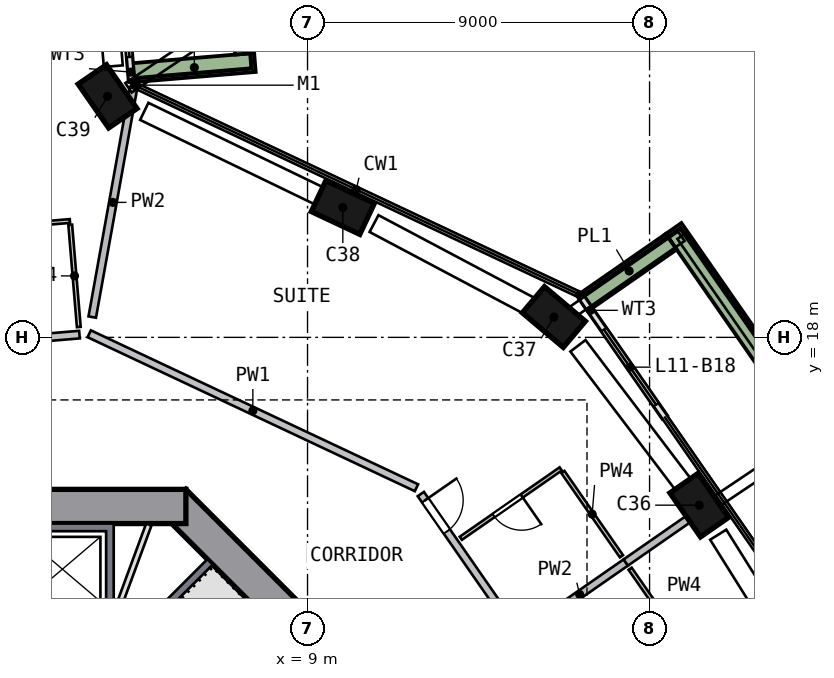
"""IFC4 building model, lengths in metres.
Left out: names, types, materials, properties, quantities, classifications, styles, units other than length and angle.
Written with IfcOpenShell. Run it as: python <this file> out.ifc"""

import sys

from ifc_helpers import new_model, si_unit, direction, frame, frame_2d, origin, origin_2d, place, context, subcontext, project, spatial, polyline, rectangle, outline, extrude, element, fill, save


model = new_model("IFC4")
c1 = context("Model", 3, precision=1e-05, world=origin(), true_north=direction((0.0, 1.0)))
c2 = subcontext(c1, "Body", "Model", "MODEL_VIEW")
j1 = project(units=[si_unit("LENGTHUNIT", "METRE"), si_unit("PLANEANGLEUNIT", "RADIAN")], contexts=[c1])
p1 = place(None, origin())
s1 = spatial("IfcSite", under=j1, at=p1, CompositionType="ELEMENT")
p2 = place(p1, origin())
s2 = spatial("IfcBuilding", under=s1, at=p2, CompositionType="ELEMENT")
p3 = place(p2, frame((0.0, 0.0, 53.0)))
s3 = spatial("IfcBuildingStorey", under=s2, at=p3, CompositionType="ELEMENT", Elevation=53.0)
p4 = place(p3, frame((19.386, 13.474, 0.0), z_axis=(-0.064871143, 0.091640946, 0.993676845), x_axis=(-0.567217406, 0.815879269, -0.112273915)))
e1 = element("IfcColumn", 1, at=p4, inside=s3, PredefinedType="COLUMN", context=c2, shape_type="SweptSolid", body=[
    extrude(rectangle(XDim=1.4, YDim=0.9, at=origin_2d()), origin(), (0.0, 0.0, 1.0), 3.21),
])
p5 = place(p3, frame((15.589, 18.447, 0.0), z_axis=(-0.088344265, 0.073442823, 0.993378801), x_axis=(0.758470218, -0.641502385, 0.114880889)))
e2 = element("IfcColumn", 2, at=p5, inside=s3, PredefinedType="COLUMN", context=c2, shape_type="SweptSolid", body=[
    extrude(rectangle(XDim=1.4, YDim=0.9, at=origin_2d()), origin(), (0.0, 0.0, 1.0), 3.211),
])
p6 = place(p3, frame((10.052, 21.362, 0.0), z_axis=(-0.10198402, 0.046923296, 0.993678753), x_axis=(-0.899155521, 0.422986653, -0.112257027)))
e3 = element("IfcColumn", 3, at=p6, inside=s3, PredefinedType="COLUMN", context=c2, shape_type="SweptSolid", body=[
    extrude(rectangle(XDim=1.4, YDim=0.9, at=origin_2d()), origin(), (0.0, 0.0, 1.0), 3.21),
])
p7 = place(p3, frame((3.878, 24.322, 0.0), z_axis=(-0.115760507, 0.017481889, 0.9931233), x_axis=(0.563120389, -0.822482073, 0.08011658)))
e4 = element("IfcColumn", 4, at=p7, inside=s3, PredefinedType="COLUMN", context=c2, shape_type="SweptSolid", body=[
    extrude(rectangle(XDim=1.4, YDim=0.9, at=origin_2d()), origin(), (0.0, 0.0, 1.0), 3.212),
])
p8 = place(p3, frame((13.682, 5.481, 0.0), z_axis=(0.0, 0.0, 1.0), x_axis=(-0.707106781, 0.707106781, 0.0)))
e5 = element("IfcWall", 5, at=p8, inside=s3, PredefinedType="SHEAR", context=c2, shape_type="SweptSolid", body=[
    extrude(rectangle(XDim=11.598, YDim=0.9, at=frame_2d((5.799, 0.0))), origin(), (0.0, 0.0, 1.0), 3.5),
])
p9 = place(p8, frame((2.099, 0.0, 0.0)))
e6 = element("IfcOpeningElement", 6, at=p9, cuts=e5, PredefinedType="OPENING", context=c2, shape_type="SweptSolid", body=[
    extrude(rectangle(XDim=1.2, YDim=2.1, at=frame_2d((0.6, 1.05))), frame((0.0, 0.46, 0.0), z_axis=(0.0, -1.0, 0.0), x_axis=(1.0, 0.0, 0.0)), (0.0, 0.0, 1.0), 0.92),
])
p10 = place(p3, frame((5.799, 13.55, 0.0), z_axis=(0.0, 0.0, 1.0), x_axis=(-1.0, 0.0, 0.0)))
e7 = element("IfcWall", 7, at=p10, inside=s3, PredefinedType="SHEAR", context=c2, shape_type="SweptSolid", body=[
    extrude(rectangle(XDim=11.598, YDim=0.9, at=frame_2d((5.799, 0.0))), origin(), (0.0, 0.0, 1.0), 3.5),
])
p11 = place(p10, frame((4.899, 0.0, 0.0)))
e8 = element("IfcOpeningElement", 8, at=p11, cuts=e7, PredefinedType="OPENING", context=c2, shape_type="SweptSolid", body=[
    extrude(rectangle(XDim=1.8, YDim=2.1, at=frame_2d((0.9, 1.05))), frame((0.0, 0.46, 0.0), z_axis=(0.0, -1.0, 0.0), x_axis=(1.0, 0.0, 0.0)), (0.0, 0.0, 1.0), 0.92),
])
p12 = place(p3, frame((4.367, 24.781, 0.0), z_axis=(0.0, 0.0, 1.0), x_axis=(-0.083674993, 0.996493099, 0.0)))
e9 = element("IfcWall", 9, at=p12, inside=s3, PredefinedType="SOLIDWALL", context=c2, shape_type="SweptSolid", body=[
    extrude(rectangle(XDim=3.402, YDim=0.15, at=frame_2d((1.701, 0.0))), origin(), (0.0, 0.0, 1.0), 2.425),
])
p13 = place(p12, frame((0.602, 0.0, 0.0)))
e10 = element("IfcOpeningElement", 10, at=p13, cuts=e9, PredefinedType="OPENING", context=c2, shape_type="SweptSolid", body=[
    extrude(rectangle(XDim=2.4, YDim=2.4, at=frame_2d((1.2, 1.2))), frame((0.0, 0.085, 0.0), z_axis=(0.0, -1.0, 0.0), x_axis=(1.0, 0.0, 0.0)), (0.0, 0.0, 1.0), 0.17),
])
p14 = place(p3, frame((18.398, 15.902, 0.0), z_axis=(0.0, 0.0, 1.0), x_axis=(-0.570742323, 0.821129223, 0.0)))
e11 = element("IfcWall", 11, at=p14, inside=s3, PredefinedType="SOLIDWALL", context=c2, shape_type="SweptSolid", body=[
    extrude(rectangle(XDim=3.842, YDim=0.15, at=frame_2d((1.921, 0.0))), origin(), (0.0, 0.0, 1.0), 2.425),
])
p15 = place(p14, frame((0.4, 0.0, 0.0)))
e12 = element("IfcOpeningElement", 12, at=p15, cuts=e11, PredefinedType="OPENING", context=c2, shape_type="SweptSolid", body=[
    extrude(rectangle(XDim=2.4, YDim=2.4, at=frame_2d((1.2, 1.2))), frame((0.0, 0.085, 0.0), z_axis=(0.0, -1.0, 0.0), x_axis=(1.0, 0.0, 0.0)), (0.0, 0.0, 1.0), 0.17),
])
p16 = place(p3, frame((26.465, 9.597, 0.0), z_axis=(0.0, 0.0, 1.0), x_axis=(-0.570705822, 0.821154593, 0.0)))
e13 = element("IfcWall", 13, at=p16, inside=s3, PredefinedType="SOLIDWALL", context=c2, shape_type="SweptSolid", body=[
    extrude(rectangle(XDim=13.723, YDim=0.5, at=frame_2d((6.862, 0.0))), origin(), (0.0, 0.0, 1.0), 0.7),
])
p17 = place(p3, frame((18.57, 20.518, 0.0), z_axis=(0.0, 0.0, 1.0), x_axis=(-0.821165079, -0.570690734, 0.0)))
e14 = element("IfcWall", 14, at=p17, inside=s3, PredefinedType="SOLIDWALL", context=c2, shape_type="SweptSolid", body=[
    extrude(rectangle(XDim=2.699, YDim=0.5, at=frame_2d((1.35, 0.0))), origin(), (0.0, 0.0, 1.0), 0.7),
])
p18 = place(p3, frame((4.427, 24.966, 0.0), z_axis=(0.0, 0.0, 1.0), x_axis=(0.996489211, 0.083721273, 0.0)))
e15 = element("IfcWall", 15, at=p18, inside=s3, PredefinedType="SOLIDWALL", context=c2, shape_type="SweptSolid", body=[
    extrude(rectangle(XDim=3.199, YDim=0.5, at=frame_2d((1.6, 0.0))), origin(), (0.0, 0.0, 1.0), 0.7),
])
p19 = place(p3, frame((7.345, 25.462, 0.0), z_axis=(0.0, 0.0, 1.0), x_axis=(-0.08367557, 0.99649305, 0.0)))
e16 = element("IfcWall", 16, at=p19, inside=s3, PredefinedType="SOLIDWALL", context=c2, shape_type="SweptSolid", body=[
    extrude(rectangle(XDim=16.033, YDim=0.5, at=frame_2d((8.016, 0.0))), origin(), (0.0, 0.0, 1.0), 0.7),
])
p20 = place(p3, origin())
e17 = element("IfcWall", 17, at=p20, inside=s3, PredefinedType="SOLIDWALL", context=c2, shape_type="SweptSolid", body=[
    extrude(outline(polyline([(3.9, 13.1), (3.9, 10.9), (3.7, 10.9), (3.7, 12.9), (1.4, 12.9), (1.4, 10.9), (1.2, 10.9), (1.2, 13.1), (3.9, 13.1)])), origin(), (0.0, 0.0, 1.0), 3.19),
])
p21 = place(p3, frame((3.677, 9.334, 0.0), z_axis=(0.0, 0.0, 1.0), x_axis=(0.707106781, 0.707106781, 0.0)))
e18 = element("IfcWall", 18, at=p21, inside=s3, PredefinedType="SOLIDWALL", context=c2, shape_type="SweptSolid", body=[
    extrude(rectangle(XDim=3.9, YDim=0.2, at=frame_2d((1.95, 0.0))), origin(), (0.0, 0.0, 1.0), 3.19),
])
p22 = place(p3, frame((1.776, 4.813, 0.0), z_axis=(0.0, 0.0, 1.0), x_axis=(0.346112737, 0.93819293, 0.0)))
e19 = element("IfcWall", 19, at=p22, inside=s3, PredefinedType="PARTITIONING", context=c2, shape_type="SweptSolid", body=[
    extrude(rectangle(XDim=8.803, YDim=0.15, at=frame_2d((4.402, 0.0))), origin(), (0.0, 0.0, 1.0), 3.19),
])
p23 = place(p22, frame((1.4, 0.0, 0.0)))
e20 = element("IfcOpeningElement", 20, at=p23, cuts=e19, PredefinedType="OPENING", context=c2, shape_type="SweptSolid", body=[
    extrude(rectangle(XDim=1.8, YDim=2.1, at=frame_2d((0.9, 1.05))), frame((0.0, 0.085, 0.0), z_axis=(0.0, -1.0, 0.0), x_axis=(1.0, 0.0, 0.0)), (0.0, 0.0, 1.0), 0.17),
])
p24 = place(p3, frame((2.998, 18.073, 0.0), z_axis=(0.0, 0.0, 1.0), x_axis=(-0.996495064, -0.083651589, 0.0)))
e21 = element("IfcWall", 21, at=p24, inside=s3, PredefinedType="SOLIDWALL", context=c2, shape_type="SweptSolid", body=[
    extrude(rectangle(XDim=3.4, YDim=0.2, at=frame_2d((1.7, 0.0))), origin(), (0.0, 0.0, 1.0), 3.19),
])
p25 = place(p3, frame((11.866, 14.042, 0.0), z_axis=(0.0, 0.0, 1.0), x_axis=(-0.90483033, 0.425772326, 0.0)))
e22 = element("IfcWall", 22, at=p25, inside=s3, PredefinedType="SOLIDWALL", context=c2, shape_type="SweptSolid", body=[
    extrude(rectangle(XDim=9.516, YDim=0.2, at=frame_2d((4.758, 0.0))), origin(), (0.0, 0.0, 1.0), 3.19),
])
p26 = place(p3, frame((11.981, 13.877, 0.0), z_axis=(0.0, 0.0, 1.0), x_axis=(0.570714468, -0.821148583, 0.0)))
e23 = element("IfcWall", 23, at=p26, inside=s3, PredefinedType="SOLIDWALL", context=c2, shape_type="SweptSolid", body=[
    extrude(rectangle(XDim=9.116, YDim=0.2, at=frame_2d((4.558, 0.0))), origin(), (0.0, 0.0, 1.0), 3.19),
])
p27 = place(p26, frame((0.2, 0.0, 0.0)))
e24 = element("IfcOpeningElement", 24, at=p27, cuts=e23, PredefinedType="OPENING", context=c2, shape_type="SweptSolid", body=[
    extrude(rectangle(XDim=1.0, YDim=2.1, at=frame_2d((0.5, 1.05))), frame((0.0, 0.11, 0.0), z_axis=(0.0, -1.0, 0.0), x_axis=(1.0, 0.0, 0.0)), (0.0, 0.0, 1.0), 0.22),
])
p28 = place(p3, frame((4.421, 24.57, 0.0), z_axis=(0.0, 0.0, 1.0), x_axis=(-0.177091295, -0.984194429, 0.0)))
e25 = element("IfcWall", 25, at=p28, inside=s3, PredefinedType="SOLIDWALL", context=c2, shape_type="SweptSolid", body=[
    extrude(rectangle(XDim=6.132, YDim=0.2, at=frame_2d((3.066, 0.0))), origin(), (0.0, 0.0, 1.0), 3.19),
])
p29 = place(p3, frame((14.949, 10.39, 0.0), z_axis=(0.0, 0.0, 1.0), x_axis=(0.82115792, 0.570701034, 0.0)))
e26 = element("IfcWall", 26, at=p29, inside=s3, PredefinedType="SOLIDWALL", context=c2, shape_type="SweptSolid", body=[
    extrude(rectangle(XDim=2.953, YDim=0.2, at=frame_2d((1.476, 0.0))), origin(), (0.0, 0.0, 1.0), 3.19),
])
p30 = place(p3, frame((17.374, 12.075, 0.0), z_axis=(0.0, 0.0, 1.0), x_axis=(0.821109247, 0.570771062, 0.0)))
e27 = element("IfcWall", 27, at=p30, inside=s3, PredefinedType="SOLIDWALL", context=c2, shape_type="SweptSolid", body=[
    extrude(rectangle(XDim=2.95, YDim=0.2, at=frame_2d((1.475, 0.0))), origin(), (0.0, 0.0, 1.0), 3.19),
])
p31 = place(p3, frame((2.747, 21.062, 0.0), z_axis=(0.0, 0.0, 1.0), x_axis=(-0.996491885, -0.08368945, 0.0)))
e28 = element("IfcWall", 28, at=p31, inside=s3, PredefinedType="PARTITIONING", context=c2, shape_type="SweptSolid", body=[
    extrude(rectangle(XDim=3.2, YDim=0.1, at=frame_2d((1.6, 0.0))), origin(), (0.0, 0.0, 1.0), 3.19),
])
p32 = place(p31, frame((1.25, 0.0, 0.0)))
e29 = element("IfcOpeningElement", 29, at=p32, cuts=e28, PredefinedType="OPENING", context=c2, shape_type="SweptSolid", body=[
    extrude(rectangle(XDim=0.9, YDim=2.1, at=frame_2d((0.45, 1.05))), frame((0.0, 0.06, 0.0), z_axis=(0.0, -1.0, 0.0), x_axis=(1.0, 0.0, 0.0)), (0.0, 0.0, 1.0), 0.12),
])
p33 = place(p3, frame((2.981, 18.272, 0.0), z_axis=(0.0, 0.0, 1.0), x_axis=(-0.083644148, 0.996495688, 0.0)))
e30 = element("IfcWall", 30, at=p33, inside=s3, PredefinedType="PARTITIONING", context=c2, shape_type="SweptSolid", body=[
    extrude(rectangle(XDim=2.7, YDim=0.1, at=frame_2d((1.35, 0.0))), origin(), (0.0, 0.0, 1.0), 3.19),
])
p34 = place(p3, frame((15.662, 14.539, 0.0), z_axis=(0.0, 0.0, 1.0), x_axis=(-0.821155462, -0.570704572, 0.0)))
e31 = element("IfcWall", 31, at=p34, inside=s3, PredefinedType="PARTITIONING", context=c2, shape_type="SweptSolid", body=[
    extrude(rectangle(XDim=3.2, YDim=0.1, at=frame_2d((1.6, 0.0))), origin(), (0.0, 0.0, 1.0), 3.19),
])
p35 = place(p34, frame((1.25, 0.0, 0.0)))
e32 = element("IfcOpeningElement", 32, at=p35, cuts=e31, PredefinedType="OPENING", context=c2, shape_type="SweptSolid", body=[
    extrude(rectangle(XDim=0.9, YDim=2.1, at=frame_2d((0.45, 1.05))), frame((0.0, 0.06, 0.0), z_axis=(0.0, -1.0, 0.0), x_axis=(1.0, 0.0, 0.0)), (0.0, 0.0, 1.0), 0.12),
])
p36 = place(p3, frame((15.719, 14.457, 0.0), z_axis=(0.0, 0.0, 1.0), x_axis=(0.570704152, -0.821155753, 0.0)))
e33 = element("IfcWall", 33, at=p36, inside=s3, PredefinedType="PARTITIONING", context=c2, shape_type="SweptSolid", body=[
    extrude(rectangle(XDim=2.7, YDim=0.1, at=frame_2d((1.35, 0.0))), origin(), (0.0, 0.0, 1.0), 3.19),
])
p37 = place(p3, frame((19.029, 9.694, 0.0), z_axis=(0.0, 0.0, 1.0), x_axis=(-0.570746527, 0.821126301, 0.0)))
e34 = element("IfcWall", 34, at=p37, inside=s3, PredefinedType="PARTITIONING", context=c2, shape_type="SweptSolid", body=[
    extrude(rectangle(XDim=2.7, YDim=0.1, at=frame_2d((1.35, 0.0))), origin(), (0.0, 0.0, 1.0), 3.19),
])
p38 = place(p13, origin())
e35 = element("IfcDoor", 35, at=p38, inside=s3, OperationType="SLIDING_TO_LEFT", PredefinedType="DOOR", context=c2, shape_type="SweptSolid", body=[
    extrude(rectangle(XDim=2.4, YDim=2.4, at=frame_2d((1.2, 1.2))), frame((0.0, 0.025, 0.0), z_axis=(0.0, -1.0, 0.0), x_axis=(1.0, 0.0, 0.0)), (0.0, 0.0, 1.0), 0.05),
])
fill(e10, e35)
p39 = place(p15, origin())
e36 = element("IfcDoor", 36, at=p39, inside=s3, OperationType="SLIDING_TO_RIGHT", PredefinedType="DOOR", context=c2, shape_type="SweptSolid", body=[
    extrude(rectangle(XDim=2.4, YDim=2.4, at=frame_2d((1.2, 1.2))), frame((0.0, 0.025, 0.0), z_axis=(0.0, -1.0, 0.0), x_axis=(1.0, 0.0, 0.0)), (0.0, 0.0, 1.0), 0.05),
])
fill(e12, e36)
p40 = place(p27, origin())
e37 = element("IfcDoor", 37, at=p40, inside=s3, OperationType="SINGLE_SWING_LEFT", PredefinedType="DOOR", context=c2, shape_type="SweptSolid", body=[
    extrude(rectangle(XDim=1.0, YDim=2.1, at=frame_2d((0.5, 1.05))), frame((0.0, 0.025, 0.0), z_axis=(0.0, -1.0, 0.0), x_axis=(1.0, 0.0, 0.0)), (0.0, 0.0, 1.0), 0.05),
])
fill(e24, e37)
p41 = place(p35, origin())
e38 = element("IfcDoor", 38, at=p41, inside=s3, OperationType="SINGLE_SWING_LEFT", PredefinedType="DOOR", context=c2, shape_type="SweptSolid", body=[
    extrude(rectangle(XDim=0.9, YDim=2.1, at=frame_2d((0.45, 1.05))), frame((0.0, 0.025, 0.0), z_axis=(0.0, -1.0, 0.0), x_axis=(1.0, 0.0, 0.0)), (0.0, 0.0, 1.0), 0.05),
])
fill(e32, e38)
save(model, sys.argv[1])
